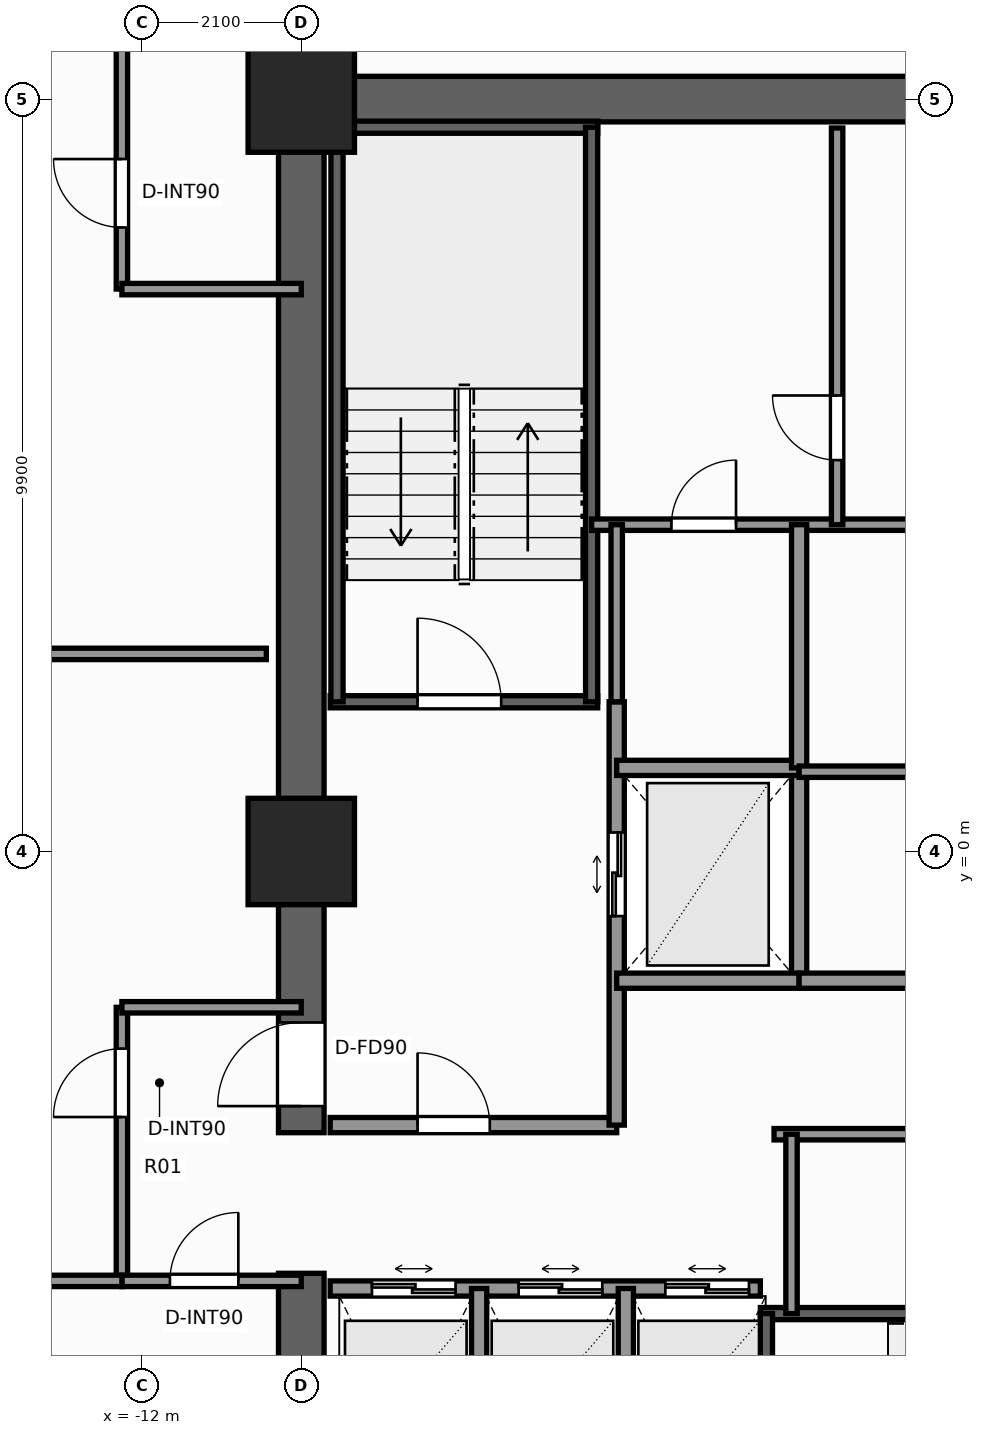
"""IFC4 building model, lengths in metres.
Left out: names, types, materials, properties, quantities, classifications, styles, units other than length and angle.
Written with IfcOpenShell. Run it as: python <this file> out.ifc"""

import sys

from ifc_helpers import new_model, si_unit, direction, frame, frame_2d, origin, origin_2d, place, context, subcontext, project, spatial, rectangle, extrude, element, fill, save


model = new_model("IFC4")
c1 = context("Model", 3, precision=1e-05, world=origin(), true_north=direction((0.0, 1.0)))
c2 = subcontext(c1, "Body", "Model", "MODEL_VIEW")
j1 = project(units=[si_unit("LENGTHUNIT", "METRE"), si_unit("PLANEANGLEUNIT", "RADIAN")], contexts=[c1])
p1 = place(None, origin())
s1 = spatial("IfcSite", under=j1, at=p1, CompositionType="ELEMENT")
p2 = place(p1, origin())
s2 = spatial("IfcBuilding", under=s1, at=p2, CompositionType="ELEMENT")
p3 = place(p2, frame((0.0, 0.0, 88.7)))
s3 = spatial("IfcBuildingStorey", under=s2, at=p3, CompositionType="ELEMENT", Elevation=88.7)
p4 = place(p3, frame((-10.2, 9.9, 0.0), z_axis=(0.0, 0.0, 1.0), x_axis=(1.0, 0.0, 0.0)))
e1 = element("IfcWall", 1, at=p4, inside=s3, PredefinedType="SHEAR", context=c2, shape_type="SweptSolid", body=[
    extrude(rectangle(XDim=14.62, YDim=0.6, at=frame_2d((7.31, 0.0))), origin(), (0.0, 0.0, 1.0), 3.3),
])
p5 = place(p3, frame((-9.9, -9.6, 0.0), z_axis=(0.0, 0.0, 1.0), x_axis=(0.0, 1.0, 0.0)))
e2 = element("IfcWall", 2, at=p5, inside=s3, PredefinedType="SHEAR", context=c2, shape_type="SweptSolid", body=[
    extrude(rectangle(XDim=4.05, YDim=0.6, at=frame_2d((2.025, 0.0))), origin(), (0.0, 0.0, 1.0), 3.3),
])
p6 = place(p3, frame((-9.9, -3.7, 0.0), z_axis=(0.0, 0.0, 1.0), x_axis=(0.0, 1.0, 0.0)))
e3 = element("IfcWall", 3, at=p6, inside=s3, PredefinedType="SHEAR", context=c2, shape_type="SweptSolid", body=[
    extrude(rectangle(XDim=13.3, YDim=0.6, at=frame_2d((6.65, 0.0))), origin(), (0.0, 0.0, 1.0), 3.3),
])
p7 = place(p6, frame((0.35, 0.0, 0.0)))
e4 = element("IfcOpeningElement", 4, at=p7, cuts=e3, PredefinedType="OPENING", context=c2, shape_type="SweptSolid", body=[
    extrude(rectangle(XDim=1.1, YDim=2.2, at=frame_2d((0.55, 1.1))), frame((0.0, 0.31, 0.0), z_axis=(0.0, -1.0, 0.0), x_axis=(1.0, 0.0, 0.0)), (0.0, 0.0, 1.0), 0.62),
])
for number, where, z_axis, x_axis in (
    (5, (-9.9, 9.9, 0.0), (0.0, 0.0, 1.0), (1.0, 0.0, 0.0)),
    (6, (-9.9, 0.0, 0.0), (0.0, 0.0, 1.0), (1.0, 0.0, 0.0)),
):
    element("IfcColumn", number, at=place(p3, frame(where, z_axis=z_axis, x_axis=x_axis)), inside=s3, PredefinedType="COLUMN", context=c2, shape_type="SweptSolid", body=[
        extrude(rectangle(XDim=1.4, YDim=1.4, at=origin_2d()), origin(), (0.0, 0.0, 1.0), 3.3),
    ])
p8 = place(p3, frame((-9.52, 1.97, 0.0), z_axis=(0.0, 0.0, 1.0), x_axis=(1.0, 0.0, 0.0)))
e7 = element("IfcWall", 7, at=p8, inside=s3, PredefinedType="SHEAR", context=c2, shape_type="SweptSolid", body=[
    extrude(rectangle(XDim=3.52, YDim=0.16, at=frame_2d((1.76, 0.0))), origin(), (0.0, 0.0, 1.0), 3.3),
])
p9 = place(p8, frame((1.15, 0.0, 0.0)))
e8 = element("IfcOpeningElement", 8, at=p9, cuts=e7, PredefinedType="OPENING", context=c2, shape_type="SweptSolid", body=[
    extrude(rectangle(XDim=1.1, YDim=2.2, at=frame_2d((0.55, 1.1))), frame((0.0, 0.09, 0.0), z_axis=(0.0, -1.0, 0.0), x_axis=(1.0, 0.0, 0.0)), (0.0, 0.0, 1.0), 0.18),
])
p10 = place(p3, frame((-9.52, 9.53, 0.0), z_axis=(0.0, 0.0, 1.0), x_axis=(1.0, 0.0, 0.0)))
e9 = element("IfcWall", 9, at=p10, inside=s3, PredefinedType="SHEAR", context=c2, shape_type="SweptSolid", body=[
    extrude(rectangle(XDim=3.52, YDim=0.16, at=frame_2d((1.76, 0.0))), origin(), (0.0, 0.0, 1.0), 3.3),
])
for number, where, z_axis, x_axis in (
    (10, (-9.43, 1.97, 0.0), (0.0, 0.0, 1.0), (0.0, 1.0, 0.0)),
    (11, (-6.08, 1.97, 0.0), (0.0, 0.0, 1.0), (0.0, 1.0, 0.0)),
):
    element("IfcWall", number, at=place(p3, frame(where, z_axis=z_axis, x_axis=x_axis)), inside=s3, PredefinedType="SHEAR", context=c2, shape_type="SweptSolid", body=[
        extrude(rectangle(XDim=7.56, YDim=0.16, at=frame_2d((3.78, 0.0))), origin(), (0.0, 0.0, 1.0), 3.3),
    ])
p11 = place(p3, frame((-3.86, -6.08, 0.0), z_axis=(0.0, 0.0, 1.0), x_axis=(1.0, 0.0, 0.0)))
e12 = element("IfcWall", 12, at=p11, inside=s3, PredefinedType="SHEAR", context=c2, shape_type="SweptSolid", body=[
    extrude(rectangle(XDim=7.72, YDim=0.16, at=frame_2d((3.86, 0.0))), origin(), (0.0, 0.0, 1.0), 3.3),
])
p12 = place(p3, frame((-3.78, -9.43, 0.0), z_axis=(0.0, 0.0, 1.0), x_axis=(0.0, 1.0, 0.0)))
e13 = element("IfcWall", 13, at=p12, inside=s3, PredefinedType="SHEAR", context=c2, shape_type="SweptSolid", body=[
    extrude(rectangle(XDim=3.35, YDim=0.16, at=frame_2d((1.675, 0.0))), origin(), (0.0, 0.0, 1.0), 3.3),
])
p13 = place(p3, frame((-9.52, -3.6, 0.0), z_axis=(0.0, 0.0, 1.0), x_axis=(1.0, 0.0, 0.0)))
e14 = element("IfcWall", 14, at=p13, inside=s3, PredefinedType="SOLIDWALL", context=c2, shape_type="SweptSolid", body=[
    extrude(rectangle(XDim=3.77, YDim=0.2, at=frame_2d((1.885, 0.0))), origin(), (0.0, 0.0, 1.0), 3.08),
])
p14 = place(p13, frame((1.15, 0.0, 0.0)))
e15 = element("IfcOpeningElement", 15, at=p14, cuts=e14, PredefinedType="OPENING", context=c2, shape_type="SweptSolid", body=[
    extrude(rectangle(XDim=0.95, YDim=2.06, at=frame_2d((0.475, 1.03))), frame((0.0, 0.11, 0.0), z_axis=(0.0, -1.0, 0.0), x_axis=(1.0, 0.0, 0.0)), (0.0, 0.0, 1.0), 0.22),
])
p15 = place(p3, frame((-5.75, -3.6, 0.0), z_axis=(0.0, 0.0, 1.0), x_axis=(0.0, 1.0, 0.0)))
e16 = element("IfcWall", 16, at=p15, inside=s3, PredefinedType="SOLIDWALL", context=c2, shape_type="SweptSolid", body=[
    extrude(rectangle(XDim=5.57, YDim=0.2, at=frame_2d((2.785, 0.0))), origin(), (0.0, 0.0, 1.0), 3.08),
])
p16 = place(p15, frame((2.75, 0.0, 0.0)))
e17 = element("IfcOpeningElement", 17, at=p16, cuts=e16, PredefinedType="OPENING", context=c2, shape_type="SweptSolid", body=[
    extrude(rectangle(XDim=1.1, YDim=2.2, at=frame_2d((0.55, 1.1))), frame((0.0, 0.11, 0.0), z_axis=(0.0, -1.0, 0.0), x_axis=(1.0, 0.0, 0.0)), (0.0, 0.0, 1.0), 0.22),
])
p17 = place(p3, frame((-3.35, -1.7, 0.0), z_axis=(0.0, 0.0, 1.0), x_axis=(0.0, 1.0, 0.0)))
e18 = element("IfcWall", 18, at=p17, inside=s3, PredefinedType="SOLIDWALL", context=c2, shape_type="SweptSolid", body=[
    extrude(rectangle(XDim=2.8, YDim=0.2, at=frame_2d((1.4, 0.0))), origin(), (0.0, 0.0, 1.0), 3.08),
])
for number, where, z_axis, x_axis in (
    (19, (-5.75, -1.7, 0.0), (0.0, 0.0, 1.0), (1.0, 0.0, 0.0)),
    (20, (-5.75, 1.1, 0.0), (0.0, 0.0, 1.0), (1.0, 0.0, 0.0)),
):
    element("IfcWall", number, at=place(p3, frame(where, z_axis=z_axis, x_axis=x_axis)), inside=s3, PredefinedType="SOLIDWALL", context=c2, shape_type="SweptSolid", body=[
        extrude(rectangle(XDim=2.4, YDim=0.2, at=frame_2d((1.2, 0.0))), origin(), (0.0, 0.0, 1.0), 3.08),
    ])
p18 = place(p3, frame((-6.08, 4.3, 0.0), z_axis=(0.0, 0.0, 1.0), x_axis=(1.0, 0.0, 0.0)))
e21 = element("IfcWall", 21, at=p18, inside=s3, PredefinedType="PARTITIONING", context=c2, shape_type="SweptSolid", body=[
    extrude(rectangle(XDim=6.3, YDim=0.15, at=frame_2d((3.15, 0.0))), origin(), (0.0, 0.0, 1.0), 3.08),
])
p19 = place(p18, frame((1.05, 0.0, 0.0)))
e22 = element("IfcOpeningElement", 22, at=p19, cuts=e21, PredefinedType="OPENING", context=c2, shape_type="SweptSolid", body=[
    extrude(rectangle(XDim=0.85, YDim=2.03, at=frame_2d((0.425, 1.015))), frame((0.0, 0.085, 0.0), z_axis=(0.0, -1.0, 0.0), x_axis=(1.0, 0.0, 0.0)), (0.0, 0.0, 1.0), 0.17),
])
p20 = place(p3, frame((-2.85, 4.3, 0.0), z_axis=(0.0, 0.0, 1.0), x_axis=(0.0, 1.0, 0.0)))
e23 = element("IfcWall", 23, at=p20, inside=s3, PredefinedType="PARTITIONING", context=c2, shape_type="SweptSolid", body=[
    extrude(rectangle(XDim=5.22, YDim=0.15, at=frame_2d((2.61, 0.0))), origin(), (0.0, 0.0, 1.0), 3.08),
])
p21 = place(p20, frame((0.85, 0.0, 0.0)))
e24 = element("IfcOpeningElement", 24, at=p21, cuts=e23, PredefinedType="OPENING", context=c2, shape_type="SweptSolid", body=[
    extrude(rectangle(XDim=0.85, YDim=2.03, at=frame_2d((0.425, 1.015))), frame((0.0, 0.085, 0.0), z_axis=(0.0, -1.0, 0.0), x_axis=(1.0, 0.0, 0.0)), (0.0, 0.0, 1.0), 0.17),
])
p22 = place(p3, frame((-9.52, -5.75, 0.0), z_axis=(0.0, 0.0, 1.0), x_axis=(1.0, 0.0, 0.0)))
e25 = element("IfcWall", 25, at=p22, inside=s3, PredefinedType="SOLIDWALL", context=c2, shape_type="SweptSolid", body=[
    extrude(rectangle(XDim=5.66, YDim=0.2, at=frame_2d((2.83, 0.0))), origin(), (0.0, 0.0, 1.0), 3.08),
])
p23 = place(p22, frame((0.55, 0.0, 0.0)))
e26 = element("IfcOpeningElement", 26, at=p23, cuts=e25, PredefinedType="OPENING", context=c2, shape_type="SweptSolid", body=[
    extrude(rectangle(XDim=1.1, YDim=2.2, at=frame_2d((0.55, 1.1))), frame((0.0, 0.11, 0.0), z_axis=(0.0, -1.0, 0.0), x_axis=(1.0, 0.0, 0.0)), (0.0, 0.0, 1.0), 0.22),
])
p24 = place(p22, frame((2.48, 0.0, 0.0)))
e27 = element("IfcOpeningElement", 27, at=p24, cuts=e25, PredefinedType="OPENING", context=c2, shape_type="SweptSolid", body=[
    extrude(rectangle(XDim=1.1, YDim=2.2, at=frame_2d((0.55, 1.1))), frame((0.0, 0.11, 0.0), z_axis=(0.0, -1.0, 0.0), x_axis=(1.0, 0.0, 0.0)), (0.0, 0.0, 1.0), 0.22),
])
p25 = place(p22, frame((4.41, 0.0, 0.0)))
e28 = element("IfcOpeningElement", 28, at=p25, cuts=e25, PredefinedType="OPENING", context=c2, shape_type="SweptSolid", body=[
    extrude(rectangle(XDim=1.1, YDim=2.2, at=frame_2d((0.55, 1.1))), frame((0.0, 0.11, 0.0), z_axis=(0.0, -1.0, 0.0), x_axis=(1.0, 0.0, 0.0)), (0.0, 0.0, 1.0), 0.22),
])
for number, where, z_axis, x_axis in (
    (29, (-7.56, -9.52, 0.0), (0.0, 0.0, 1.0), (0.0, 1.0, 0.0)),
    (30, (-5.63, -9.52, 0.0), (0.0, 0.0, 1.0), (0.0, 1.0, 0.0)),
):
    element("IfcWall", number, at=place(p3, frame(where, z_axis=z_axis, x_axis=x_axis)), inside=s3, PredefinedType="SOLIDWALL", context=c2, shape_type="SweptSolid", body=[
        extrude(rectangle(XDim=3.77, YDim=0.2, at=frame_2d((1.885, 0.0))), origin(), (0.0, 0.0, 1.0), 3.08),
    ])
p26 = place(p3, frame((-3.35, -1.7, 0.0), z_axis=(0.0, 0.0, 1.0), x_axis=(1.0, 0.0, 0.0)))
e31 = element("IfcWall", 31, at=p26, inside=s3, PredefinedType="SOLIDWALL", context=c2, shape_type="SweptSolid", body=[
    extrude(rectangle(XDim=6.7, YDim=0.2, at=frame_2d((3.35, 0.0))), origin(), (0.0, 0.0, 1.0), 3.08),
])
p27 = place(p3, frame((-3.35, 1.1, 0.0), z_axis=(0.0, 0.0, 1.0), x_axis=(0.0, 1.0, 0.0)))
e32 = element("IfcWall", 32, at=p27, inside=s3, PredefinedType="SOLIDWALL", context=c2, shape_type="SweptSolid", body=[
    extrude(rectangle(XDim=3.2, YDim=0.2, at=frame_2d((1.6, 0.0))), origin(), (0.0, 0.0, 1.0), 3.08),
])
p28 = place(p3, frame((-3.35, 1.05, 0.0), z_axis=(0.0, 0.0, 1.0), x_axis=(1.0, 0.0, 0.0)))
e33 = element("IfcWall", 33, at=p28, inside=s3, PredefinedType="PARTITIONING", context=c2, shape_type="SweptSolid", body=[
    extrude(rectangle(XDim=6.7, YDim=0.15, at=frame_2d((3.35, 0.0))), origin(), (0.0, 0.0, 1.0), 3.08),
])
p29 = place(p28, frame((4.2, 0.0, 0.0)))
e34 = element("IfcOpeningElement", 34, at=p29, cuts=e33, PredefinedType="OPENING", context=c2, shape_type="SweptSolid", body=[
    extrude(rectangle(XDim=0.85, YDim=2.03, at=frame_2d((0.425, 1.015))), frame((0.0, 0.085, 0.0), z_axis=(0.0, -1.0, 0.0), x_axis=(1.0, 0.0, 0.0)), (0.0, 0.0, 1.0), 0.17),
])
p30 = place(p3, frame((-3.68, -3.72, 0.0), z_axis=(0.0, 0.0, 1.0), x_axis=(1.0, 0.0, 0.0)))
e35 = element("IfcWall", 35, at=p30, inside=s3, PredefinedType="PARTITIONING", context=c2, shape_type="SweptSolid", body=[
    extrude(rectangle(XDim=7.36, YDim=0.15, at=frame_2d((3.68, 0.0))), origin(), (0.0, 0.0, 1.0), 3.08),
])
p31 = place(p3, frame((-3.45, -6.08, 0.0), z_axis=(0.0, 0.0, 1.0), x_axis=(0.0, 1.0, 0.0)))
e36 = element("IfcWall", 36, at=p31, inside=s3, PredefinedType="PARTITIONING", context=c2, shape_type="SweptSolid", body=[
    extrude(rectangle(XDim=2.36, YDim=0.15, at=frame_2d((1.18, 0.0))), origin(), (0.0, 0.0, 1.0), 3.08),
])
p32 = place(p3, frame((-5.75, 1.97, 0.0), z_axis=(0.0, 0.0, 1.0), x_axis=(0.0, 1.0, 0.0)))
e37 = element("IfcWall", 37, at=p32, inside=s3, PredefinedType="PARTITIONING", context=c2, shape_type="SweptSolid", body=[
    extrude(rectangle(XDim=2.33, YDim=0.15, at=frame_2d((1.165, 0.0))), origin(), (0.0, 0.0, 1.0), 3.08),
])
p33 = place(p3, frame((-12.26, 7.4, 0.0), z_axis=(0.0, 0.0, 1.0), x_axis=(0.0, 1.0, 0.0)))
e38 = element("IfcWall", 38, at=p33, inside=s3, PredefinedType="PARTITIONING", context=c2, shape_type="SweptSolid", body=[
    extrude(rectangle(XDim=5.02, YDim=0.15, at=frame_2d((2.51, 0.0))), origin(), (0.0, 0.0, 1.0), 2.292),
])
p34 = place(p33, frame((0.811, 0.0, 0.0)))
e39 = element("IfcOpeningElement", 39, at=p34, cuts=e38, PredefinedType="OPENING", context=c2, shape_type="SweptSolid", body=[
    extrude(rectangle(XDim=0.9, YDim=2.06, at=frame_2d((0.45, 1.03))), frame((0.0, 0.085, 0.0), z_axis=(0.0, -1.0, 0.0), x_axis=(1.0, 0.0, 0.0)), (0.0, 0.0, 1.0), 0.17),
])
p35 = place(p3, frame((-12.26, 7.4, 0.0), z_axis=(0.0, 0.0, 1.0), x_axis=(1.0, 0.0, 0.0)))
e40 = element("IfcWall", 40, at=p35, inside=s3, PredefinedType="PARTITIONING", context=c2, shape_type="SweptSolid", body=[
    extrude(rectangle(XDim=2.36, YDim=0.15, at=frame_2d((1.18, 0.0))), origin(), (0.0, 0.0, 1.0), 3.08),
])
p36 = place(p3, frame((-12.26, -5.65, 0.0), z_axis=(0.0, 0.0, 1.0), x_axis=(0.0, 1.0, 0.0)))
e41 = element("IfcWall", 41, at=p36, inside=s3, PredefinedType="PARTITIONING", context=c2, shape_type="SweptSolid", body=[
    extrude(rectangle(XDim=3.6, YDim=0.15, at=frame_2d((1.8, 0.0))), origin(), (0.0, 0.0, 1.0), 2.292),
])
p37 = place(p36, frame((2.156, 0.0, 0.0)))
e42 = element("IfcOpeningElement", 42, at=p37, cuts=e41, PredefinedType="OPENING", context=c2, shape_type="SweptSolid", body=[
    extrude(rectangle(XDim=0.9, YDim=2.06, at=frame_2d((0.45, 1.03))), frame((0.0, 0.085, 0.0), z_axis=(0.0, -1.0, 0.0), x_axis=(1.0, 0.0, 0.0)), (0.0, 0.0, 1.0), 0.17),
])
p38 = place(p3, frame((-12.26, -2.05, 0.0), z_axis=(0.0, 0.0, 1.0), x_axis=(1.0, 0.0, 0.0)))
e43 = element("IfcWall", 43, at=p38, inside=s3, PredefinedType="PARTITIONING", context=c2, shape_type="SweptSolid", body=[
    extrude(rectangle(XDim=2.36, YDim=0.15, at=frame_2d((1.18, 0.0))), origin(), (0.0, 0.0, 1.0), 3.08),
])
p39 = place(p3, frame((-12.26, -5.65, 0.0), z_axis=(0.0, 0.0, 1.0), x_axis=(1.0, 0.0, 0.0)))
e44 = element("IfcWall", 44, at=p39, inside=s3, PredefinedType="PARTITIONING", context=c2, shape_type="SweptSolid", body=[
    extrude(rectangle(XDim=2.36, YDim=0.15, at=frame_2d((1.18, 0.0))), origin(), (0.0, 0.0, 1.0), 3.08),
])
p40 = place(p39, frame((0.632, 0.0, 0.0)))
e45 = element("IfcOpeningElement", 45, at=p40, cuts=e44, PredefinedType="OPENING", context=c2, shape_type="SweptSolid", body=[
    extrude(rectangle(XDim=0.9, YDim=2.06, at=frame_2d((0.45, 1.03))), frame((0.0, 0.085, 0.0), z_axis=(0.0, -1.0, 0.0), x_axis=(1.0, 0.0, 0.0)), (0.0, 0.0, 1.0), 0.17),
])
p41 = place(p3, frame((-20.38, 2.6, 0.0), z_axis=(0.0, 0.0, 1.0), x_axis=(1.0, 0.0, 0.0)))
e46 = element("IfcWall", 46, at=p41, inside=s3, PredefinedType="PARTITIONING", context=c2, shape_type="SweptSolid", body=[
    extrude(rectangle(XDim=10.02, YDim=0.15, at=frame_2d((5.01, 0.0))), origin(), (0.0, 0.0, 1.0), 2.449),
])
p42 = place(p3, frame((-20.38, -5.65, 0.0), z_axis=(0.0, 0.0, 1.0), x_axis=(1.0, 0.0, 0.0)))
e47 = element("IfcWall", 47, at=p42, inside=s3, PredefinedType="PARTITIONING", context=c2, shape_type="SweptSolid", body=[
    extrude(rectangle(XDim=8.12, YDim=0.15, at=frame_2d((4.06, 0.0))), origin(), (0.0, 0.0, 1.0), 2.449),
])
p43 = place(p9, origin())
e48 = element("IfcDoor", 48, at=p43, inside=s3, OperationType="SINGLE_SWING_LEFT", PredefinedType="DOOR", context=c2, shape_type="SweptSolid", body=[
    extrude(rectangle(XDim=1.1, YDim=2.2, at=frame_2d((0.55, 1.1))), frame((0.0, 0.025, 0.0), z_axis=(0.0, -1.0, 0.0), x_axis=(1.0, 0.0, 0.0)), (0.0, 0.0, 1.0), 0.05),
])
fill(e8, e48)
p44 = place(p7, origin())
e49 = element("IfcDoor", 49, at=p44, inside=s3, OperationType="SINGLE_SWING_LEFT", PredefinedType="DOOR", context=c2, shape_type="SweptSolid", body=[
    extrude(rectangle(XDim=1.1, YDim=2.2, at=frame_2d((0.55, 1.1))), frame((0.0, 0.025, 0.0), z_axis=(0.0, -1.0, 0.0), x_axis=(1.0, 0.0, 0.0)), (0.0, 0.0, 1.0), 0.05),
])
fill(e4, e49)
p45 = place(p16, origin())
e50 = element("IfcDoor", 50, at=p45, inside=s3, OperationType="DOUBLE_DOOR_SLIDING", PredefinedType="DOOR", context=c2, shape_type="SweptSolid", body=[
    extrude(rectangle(XDim=1.1, YDim=2.2, at=frame_2d((0.55, 1.1))), frame((0.0, 0.025, 0.0), z_axis=(0.0, -1.0, 0.0), x_axis=(1.0, 0.0, 0.0)), (0.0, 0.0, 1.0), 0.05),
])
fill(e17, e50)
p46 = place(p21, origin())
e51 = element("IfcDoor", 51, at=p46, inside=s3, OperationType="SINGLE_SWING_RIGHT", PredefinedType="DOOR", context=c2, shape_type="SweptSolid", body=[
    extrude(rectangle(XDim=0.85, YDim=2.03, at=frame_2d((0.425, 1.015))), frame((0.0, 0.025, 0.0), z_axis=(0.0, -1.0, 0.0), x_axis=(1.0, 0.0, 0.0)), (0.0, 0.0, 1.0), 0.05),
])
fill(e24, e51)
p47 = place(p23, origin())
e52 = element("IfcDoor", 52, at=p47, inside=s3, OperationType="DOUBLE_DOOR_SLIDING", PredefinedType="DOOR", context=c2, shape_type="SweptSolid", body=[
    extrude(rectangle(XDim=1.1, YDim=2.2, at=frame_2d((0.55, 1.1))), frame((0.0, 0.025, 0.0), z_axis=(0.0, -1.0, 0.0), x_axis=(1.0, 0.0, 0.0)), (0.0, 0.0, 1.0), 0.05),
])
fill(e26, e52)
p48 = place(p24, origin())
e53 = element("IfcDoor", 53, at=p48, inside=s3, OperationType="DOUBLE_DOOR_SLIDING", PredefinedType="DOOR", context=c2, shape_type="SweptSolid", body=[
    extrude(rectangle(XDim=1.1, YDim=2.2, at=frame_2d((0.55, 1.1))), frame((0.0, 0.025, 0.0), z_axis=(0.0, -1.0, 0.0), x_axis=(1.0, 0.0, 0.0)), (0.0, 0.0, 1.0), 0.05),
])
fill(e27, e53)
p49 = place(p25, origin())
e54 = element("IfcDoor", 54, at=p49, inside=s3, OperationType="DOUBLE_DOOR_SLIDING", PredefinedType="DOOR", context=c2, shape_type="SweptSolid", body=[
    extrude(rectangle(XDim=1.1, YDim=2.2, at=frame_2d((0.55, 1.1))), frame((0.0, 0.025, 0.0), z_axis=(0.0, -1.0, 0.0), x_axis=(1.0, 0.0, 0.0)), (0.0, 0.0, 1.0), 0.05),
])
fill(e28, e54)
p50 = place(p14, origin())
e55 = element("IfcDoor", 55, at=p50, inside=s3, OperationType="SINGLE_SWING_LEFT", PredefinedType="DOOR", context=c2, shape_type="SweptSolid", body=[
    extrude(rectangle(XDim=0.95, YDim=2.06, at=frame_2d((0.475, 1.03))), frame((0.0, 0.025, 0.0), z_axis=(0.0, -1.0, 0.0), x_axis=(1.0, 0.0, 0.0)), (0.0, 0.0, 1.0), 0.05),
])
fill(e15, e55)
p51 = place(p19, origin())
e56 = element("IfcDoor", 56, at=p51, inside=s3, OperationType="SINGLE_SWING_RIGHT", PredefinedType="DOOR", context=c2, shape_type="SweptSolid", body=[
    extrude(rectangle(XDim=0.85, YDim=2.03, at=frame_2d((0.425, 1.015))), frame((0.0, 0.025, 0.0), z_axis=(0.0, -1.0, 0.0), x_axis=(1.0, 0.0, 0.0)), (0.0, 0.0, 1.0), 0.05),
])
fill(e22, e56)
p52 = place(p34, origin())
e57 = element("IfcDoor", 57, at=p52, inside=s3, OperationType="SINGLE_SWING_RIGHT", PredefinedType="DOOR", context=c2, shape_type="SweptSolid", body=[
    extrude(rectangle(XDim=0.9, YDim=2.06, at=frame_2d((0.45, 1.03))), frame((0.0, 0.025, 0.0), z_axis=(0.0, -1.0, 0.0), x_axis=(1.0, 0.0, 0.0)), (0.0, 0.0, 1.0), 0.05),
])
fill(e39, e57)
p53 = place(p37, origin())
e58 = element("IfcDoor", 58, at=p53, inside=s3, OperationType="SINGLE_SWING_LEFT", PredefinedType="DOOR", context=c2, shape_type="SweptSolid", body=[
    extrude(rectangle(XDim=0.9, YDim=2.06, at=frame_2d((0.45, 1.03))), frame((0.0, 0.025, 0.0), z_axis=(0.0, -1.0, 0.0), x_axis=(1.0, 0.0, 0.0)), (0.0, 0.0, 1.0), 0.05),
])
fill(e42, e58)
p54 = place(p40, origin())
e59 = element("IfcDoor", 59, at=p54, inside=s3, OperationType="SINGLE_SWING_RIGHT", PredefinedType="DOOR", context=c2, shape_type="SweptSolid", body=[
    extrude(rectangle(XDim=0.9, YDim=2.06, at=frame_2d((0.45, 1.03))), frame((0.0, 0.025, 0.0), z_axis=(0.0, -1.0, 0.0), x_axis=(1.0, 0.0, 0.0)), (0.0, 0.0, 1.0), 0.05),
])
fill(e45, e59)
save(model, sys.argv[1])
